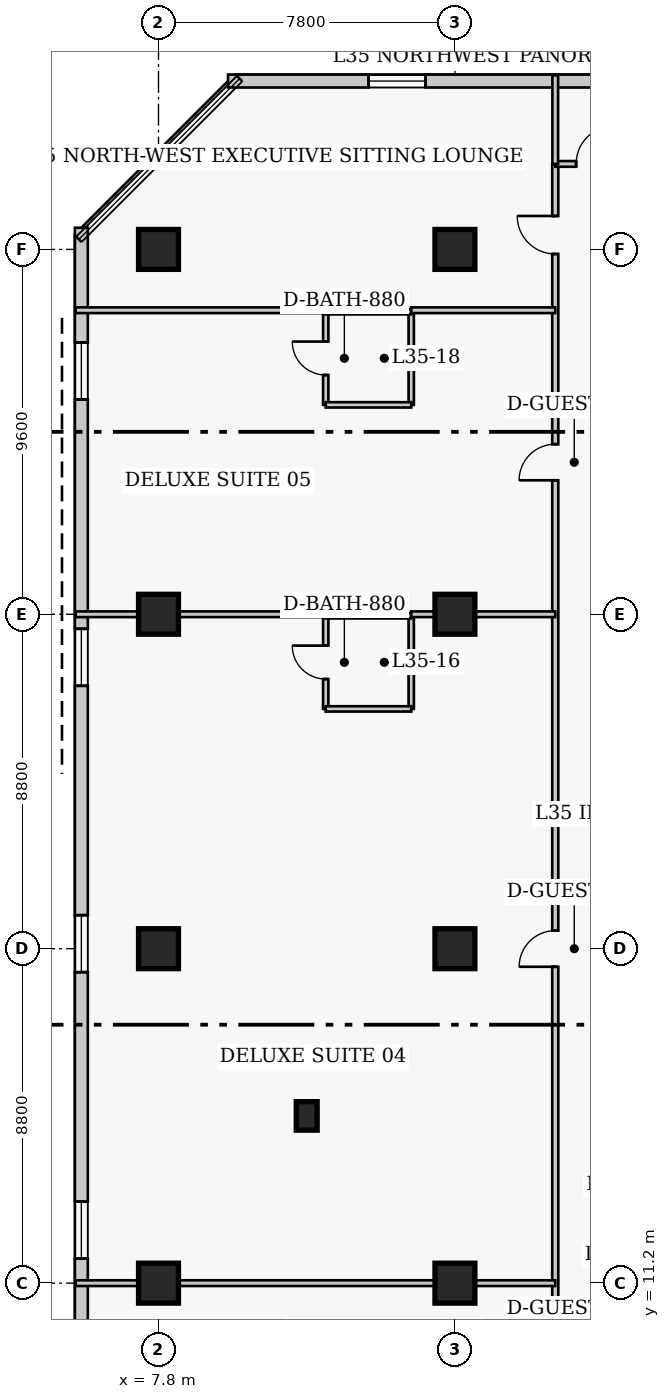
"""IFC4 building model, lengths in metres.
Left out: names, types, materials, properties, quantities, classifications, styles, units other than length and angle.
Written with IfcOpenShell. Run it as: python <this file> out.ifc"""

import sys

from ifc_helpers import new_model, si_unit, direction, frame, frame_2d, origin, origin_2d, place, context, subcontext, project, spatial, rectangle, extrude, element, fill, save


model = new_model("IFC4")
c1 = context("Model", 3, precision=1e-05, world=origin(), true_north=direction((0.0, 1.0)))
c2 = subcontext(c1, "Body", "Model", "MODEL_VIEW")
j1 = project(units=[si_unit("LENGTHUNIT", "METRE"), si_unit("PLANEANGLEUNIT", "RADIAN")], contexts=[c1])
p1 = place(None, origin())
s1 = spatial("IfcSite", under=j1, at=p1, CompositionType="ELEMENT")
p2 = place(p1, origin())
s2 = spatial("IfcBuilding", under=s1, at=p2, CompositionType="ELEMENT")
p3 = place(p2, frame((0.0, 0.0, 142.2)))
s3 = spatial("IfcBuildingStorey", under=s2, at=p3, CompositionType="ELEMENT", Elevation=142.2)
for number, where, z_axis, x_axis in (
    (1, (7.8, 11.2, 0.0), (0.0, 0.0, 1.0), (1.0, 0.0, 0.0)),
    (2, (7.8, 20.0, 0.0), (0.0, 0.0, 1.0), (1.0, 0.0, 0.0)),
    (3, (7.8, 28.8, 0.0), (0.0, 0.0, 1.0), (1.0, 0.0, 0.0)),
    (4, (7.8, 38.4, 0.0), (0.0, 0.0, 1.0), (1.0, 0.0, 0.0)),
    (5, (15.6, 11.2, 0.0), (0.0, 0.0, 1.0), (1.0, 0.0, 0.0)),
    (6, (15.6, 20.0, 0.0), (0.0, 0.0, 1.0), (1.0, 0.0, 0.0)),
    (7, (15.6, 28.8, 0.0), (0.0, 0.0, 1.0), (1.0, 0.0, 0.0)),
    (8, (15.6, 38.4, 0.0), (0.0, 0.0, 1.0), (1.0, 0.0, 0.0)),
):
    element("IfcColumn", number, at=place(p3, frame(where, z_axis=z_axis, x_axis=x_axis)), inside=s3, PredefinedType="COLUMN", context=c2, shape_type="SweptSolid", body=[
        extrude(rectangle(XDim=1.05, YDim=1.05, at=origin_2d()), origin(), (0.0, 0.0, 1.0), 3.8),
    ])
p4 = place(p3, frame((11.7, 15.6, 0.0), z_axis=(0.0, 0.0, 1.0), x_axis=(1.0, 0.0, 0.0)))
e9 = element("IfcColumn", 9, at=p4, inside=s3, PredefinedType="PILASTER", context=c2, shape_type="SweptSolid", body=[
    extrude(rectangle(XDim=0.55, YDim=0.75, at=origin_2d()), origin(), (0.0, 0.0, 1.0), 3.8),
])
p5 = place(p3, frame((36.32, 42.83, 0.0), z_axis=(0.0, 0.0, 1.0), x_axis=(-1.0, 0.0, 0.0)))
e10 = element("IfcWall", 10, at=p5, inside=s3, PredefinedType="SOLIDWALL", context=c2, shape_type="SweptSolid", body=[
    extrude(rectangle(XDim=26.69, YDim=0.34, at=frame_2d((13.345, 0.0))), origin(), (0.0, 0.0, 1.0), 3.55),
])
p6 = place(p5, frame((7.32, 0.0, 0.0)))
e11 = element("IfcOpeningElement", 11, at=p6, cuts=e10, PredefinedType="OPENING", context=c2, shape_type="SweptSolid", body=[
    extrude(rectangle(XDim=1.4, YDim=2.15, at=frame_2d((0.7, 1.075))), frame((0.0, 0.18, 0.0), z_axis=(0.0, -1.0, 0.0), x_axis=(1.0, 0.0, 0.0)), (0.0, 0.0, 1.0), 0.36),
])
p7 = place(p5, frame((2.548, 0.0, 0.85)))
e12 = element("IfcOpeningElement", 12, at=p7, cuts=e10, PredefinedType="OPENING", context=c2, shape_type="SweptSolid", body=[
    extrude(rectangle(XDim=1.5, YDim=1.75, at=frame_2d((0.75, 0.875))), frame((0.0, 0.18, 0.0), z_axis=(0.0, -1.0, 0.0), x_axis=(1.0, 0.0, 0.0)), (0.0, 0.0, 1.0), 0.36),
])
p8 = place(p5, frame((12.595, 0.0, 0.85)))
e13 = element("IfcOpeningElement", 13, at=p8, cuts=e10, PredefinedType="OPENING", context=c2, shape_type="SweptSolid", body=[
    extrude(rectangle(XDim=1.5, YDim=1.75, at=frame_2d((0.75, 0.875))), frame((0.0, 0.18, 0.0), z_axis=(0.0, -1.0, 0.0), x_axis=(1.0, 0.0, 0.0)), (0.0, 0.0, 1.0), 0.36),
])
p9 = place(p5, frame((21.492, 0.0, 0.85)))
e14 = element("IfcOpeningElement", 14, at=p9, cuts=e10, PredefinedType="OPENING", context=c2, shape_type="SweptSolid", body=[
    extrude(rectangle(XDim=1.5, YDim=1.75, at=frame_2d((0.75, 0.875))), frame((0.0, 0.18, 0.0), z_axis=(0.0, -1.0, 0.0), x_axis=(1.0, 0.0, 0.0)), (0.0, 0.0, 1.0), 0.36),
])
p10 = place(p3, frame((5.77, 38.97, 0.0), z_axis=(0.0, 0.0, 1.0), x_axis=(0.0, -1.0, 0.0)))
e15 = element("IfcWall", 15, at=p10, inside=s3, PredefinedType="SOLIDWALL", context=c2, shape_type="SweptSolid", body=[
    extrude(rectangle(XDim=30.14, YDim=0.34, at=frame_2d((15.07, 0.0))), origin(), (0.0, 0.0, 1.0), 3.55),
])
p11 = place(p10, frame((3.018, 0.0, 0.85)))
e16 = element("IfcOpeningElement", 16, at=p11, cuts=e15, PredefinedType="OPENING", context=c2, shape_type="SweptSolid", body=[
    extrude(rectangle(XDim=1.5, YDim=1.75, at=frame_2d((0.75, 0.875))), frame((0.0, 0.18, 0.0), z_axis=(0.0, -1.0, 0.0), x_axis=(1.0, 0.0, 0.0)), (0.0, 0.0, 1.0), 0.36),
])
p12 = place(p10, frame((10.552, 0.0, 0.85)))
e17 = element("IfcOpeningElement", 17, at=p12, cuts=e15, PredefinedType="OPENING", context=c2, shape_type="SweptSolid", body=[
    extrude(rectangle(XDim=1.5, YDim=1.75, at=frame_2d((0.75, 0.875))), frame((0.0, 0.18, 0.0), z_axis=(0.0, -1.0, 0.0), x_axis=(1.0, 0.0, 0.0)), (0.0, 0.0, 1.0), 0.36),
])
p13 = place(p10, frame((18.087, 0.0, 0.85)))
e18 = element("IfcOpeningElement", 18, at=p13, cuts=e15, PredefinedType="OPENING", context=c2, shape_type="SweptSolid", body=[
    extrude(rectangle(XDim=1.5, YDim=1.75, at=frame_2d((0.75, 0.875))), frame((0.0, 0.18, 0.0), z_axis=(0.0, -1.0, 0.0), x_axis=(1.0, 0.0, 0.0)), (0.0, 0.0, 1.0), 0.36),
])
p14 = place(p10, frame((25.623, 0.0, 0.85)))
e19 = element("IfcOpeningElement", 19, at=p14, cuts=e15, PredefinedType="OPENING", context=c2, shape_type="SweptSolid", body=[
    extrude(rectangle(XDim=1.5, YDim=1.75, at=frame_2d((0.75, 0.875))), frame((0.0, 0.18, 0.0), z_axis=(0.0, -1.0, 0.0), x_axis=(1.0, 0.0, 0.0)), (0.0, 0.0, 1.0), 0.36),
])
p15 = place(p3, frame((18.24, 6.85, 0.0), z_axis=(0.0, 0.0, 1.0), x_axis=(0.0, 1.0, 0.0)))
e20 = element("IfcWall", 20, at=p15, inside=s3, PredefinedType="PARTITIONING", context=c2, shape_type="SweptSolid", body=[
    extrude(rectangle(XDim=33.8, YDim=0.16, at=frame_2d((16.9, 0.0))), origin(), (0.0, 0.0, 1.0), 3.55),
])
p16 = place(p15, frame((1.7, 0.0, 0.0)))
e21 = element("IfcOpeningElement", 21, at=p16, cuts=e20, PredefinedType="OPENING", context=c2, shape_type="SweptSolid", body=[
    extrude(rectangle(XDim=0.95, YDim=2.1, at=frame_2d((0.475, 1.05))), frame((0.0, 0.09, 0.0), z_axis=(0.0, -1.0, 0.0), x_axis=(1.0, 0.0, 0.0)), (0.0, 0.0, 1.0), 0.18),
])
p17 = place(p15, frame((12.675, 0.0, 0.0)))
e22 = element("IfcOpeningElement", 22, at=p17, cuts=e20, PredefinedType="OPENING", context=c2, shape_type="SweptSolid", body=[
    extrude(rectangle(XDim=0.95, YDim=2.1, at=frame_2d((0.475, 1.05))), frame((0.0, 0.09, 0.0), z_axis=(0.0, -1.0, 0.0), x_axis=(1.0, 0.0, 0.0)), (0.0, 0.0, 1.0), 0.18),
])
p18 = place(p15, frame((25.475, 0.0, 0.0)))
e23 = element("IfcOpeningElement", 23, at=p18, cuts=e20, PredefinedType="OPENING", context=c2, shape_type="SweptSolid", body=[
    extrude(rectangle(XDim=0.95, YDim=2.1, at=frame_2d((0.475, 1.05))), frame((0.0, 0.09, 0.0), z_axis=(0.0, -1.0, 0.0), x_axis=(1.0, 0.0, 0.0)), (0.0, 0.0, 1.0), 0.18),
])
p19 = place(p15, frame((31.43, 0.0, 0.0)))
e24 = element("IfcOpeningElement", 24, at=p19, cuts=e20, PredefinedType="OPENING", context=c2, shape_type="SweptSolid", body=[
    extrude(rectangle(XDim=1.0, YDim=2.15, at=frame_2d((0.5, 1.075))), frame((0.0, 0.09, 0.0), z_axis=(0.0, -1.0, 0.0), x_axis=(1.0, 0.0, 0.0)), (0.0, 0.0, 1.0), 0.18),
])
p20 = place(p3, frame((18.24, 40.65, 0.0), z_axis=(0.0, 0.0, 1.0), x_axis=(1.0, 0.0, 0.0)))
e25 = element("IfcWall", 25, at=p20, inside=s3, PredefinedType="PARTITIONING", context=c2, shape_type="SweptSolid", body=[
    extrude(rectangle(XDim=3.86, YDim=0.15, at=frame_2d((1.93, 0.0))), origin(), (0.0, 0.0, 1.0), 3.55),
])
p21 = place(p20, frame((0.55, 0.0, 0.0)))
e26 = element("IfcOpeningElement", 26, at=p21, cuts=e25, PredefinedType="OPENING", context=c2, shape_type="SweptSolid", body=[
    extrude(rectangle(XDim=1.0, YDim=2.15, at=frame_2d((0.5, 1.075))), frame((0.0, 0.085, 0.0), z_axis=(0.0, -1.0, 0.0), x_axis=(1.0, 0.0, 0.0)), (0.0, 0.0, 1.0), 0.17),
])
p22 = place(p3, frame((18.24, 40.65, 0.0), z_axis=(0.0, 0.0, 1.0), x_axis=(0.0, 1.0, 0.0)))
e27 = element("IfcWall", 27, at=p22, inside=s3, PredefinedType="PARTITIONING", context=c2, shape_type="SweptSolid", body=[
    extrude(rectangle(XDim=2.33, YDim=0.15, at=frame_2d((1.165, 0.0))), origin(), (0.0, 0.0, 1.0), 3.55),
])
p23 = place(p3, frame((5.62, 11.2, 0.0), z_axis=(0.0, 0.0, 1.0), x_axis=(1.0, 0.0, 0.0)))
e28 = element("IfcWall", 28, at=p23, inside=s3, PredefinedType="PARTITIONING", context=c2, shape_type="SweptSolid", body=[
    extrude(rectangle(XDim=12.62, YDim=0.15, at=frame_2d((6.31, 0.0))), origin(), (0.0, 0.0, 1.0), 2.778),
])
p24 = place(p3, frame((12.2, 26.31, 0.0), z_axis=(0.0, 0.0, 1.0), x_axis=(0.0, 1.0, 0.0)))
e29 = element("IfcWall", 29, at=p24, inside=s3, PredefinedType="PLUMBINGWALL", context=c2, shape_type="SweptSolid", body=[
    extrude(rectangle(XDim=2.45, YDim=0.14, at=frame_2d((1.225, 0.0))), origin(), (0.0, 0.0, 1.0), 3.55),
])
p25 = place(p24, frame((0.785, 0.0, 0.0)))
e30 = element("IfcOpeningElement", 30, at=p25, cuts=e29, PredefinedType="OPENING", context=c2, shape_type="SweptSolid", body=[
    extrude(rectangle(XDim=0.88, YDim=2.05, at=frame_2d((0.44, 1.025))), frame((0.0, 0.08, 0.0), z_axis=(0.0, -1.0, 0.0), x_axis=(1.0, 0.0, 0.0)), (0.0, 0.0, 1.0), 0.16),
])
p26 = place(p3, frame((14.45, 26.31, 0.0), z_axis=(0.0, 0.0, 1.0), x_axis=(0.0, 1.0, 0.0)))
e31 = element("IfcWall", 31, at=p26, inside=s3, PredefinedType="PLUMBINGWALL", context=c2, shape_type="SweptSolid", body=[
    extrude(rectangle(XDim=2.45, YDim=0.14, at=frame_2d((1.225, 0.0))), origin(), (0.0, 0.0, 1.0), 3.55),
])
p27 = place(p3, frame((12.2, 26.31, 0.0), z_axis=(0.0, 0.0, 1.0), x_axis=(1.0, 0.0, 0.0)))
e32 = element("IfcWall", 32, at=p27, inside=s3, PredefinedType="PLUMBINGWALL", context=c2, shape_type="SweptSolid", body=[
    extrude(rectangle(XDim=2.25, YDim=0.14, at=frame_2d((1.125, 0.0))), origin(), (0.0, 0.0, 1.0), 3.55),
])
p28 = place(p3, frame((12.2, 28.76, 0.0), z_axis=(0.0, 0.0, 1.0), x_axis=(1.0, 0.0, 0.0)))
e33 = element("IfcWall", 33, at=p28, inside=s3, PredefinedType="PLUMBINGWALL", context=c2, shape_type="SweptSolid", body=[
    extrude(rectangle(XDim=2.25, YDim=0.14, at=frame_2d((1.125, 0.0))), origin(), (0.0, 0.0, 1.0), 2.9),
])
p29 = place(p3, frame((5.62, 28.8, 0.0), z_axis=(0.0, 0.0, 1.0), x_axis=(1.0, 0.0, 0.0)))
e34 = element("IfcWall", 34, at=p29, inside=s3, PredefinedType="PARTITIONING", context=c2, shape_type="SweptSolid", body=[
    extrude(rectangle(XDim=6.58, YDim=0.15, at=frame_2d((3.29, 0.0))), origin(), (0.0, 0.0, 1.0), 2.778),
])
p30 = place(p3, frame((14.45, 28.8, 0.0), z_axis=(0.0, 0.0, 1.0), x_axis=(1.0, 0.0, 0.0)))
e35 = element("IfcWall", 35, at=p30, inside=s3, PredefinedType="PARTITIONING", context=c2, shape_type="SweptSolid", body=[
    extrude(rectangle(XDim=3.79, YDim=0.15, at=frame_2d((1.895, 0.0))), origin(), (0.0, 0.0, 1.0), 2.778),
])
p31 = place(p3, frame((12.2, 34.31, 0.0), z_axis=(0.0, 0.0, 1.0), x_axis=(0.0, 1.0, 0.0)))
e36 = element("IfcWall", 36, at=p31, inside=s3, PredefinedType="PLUMBINGWALL", context=c2, shape_type="SweptSolid", body=[
    extrude(rectangle(XDim=2.45, YDim=0.14, at=frame_2d((1.225, 0.0))), origin(), (0.0, 0.0, 1.0), 3.55),
])
p32 = place(p31, frame((0.785, 0.0, 0.0)))
e37 = element("IfcOpeningElement", 37, at=p32, cuts=e36, PredefinedType="OPENING", context=c2, shape_type="SweptSolid", body=[
    extrude(rectangle(XDim=0.88, YDim=2.05, at=frame_2d((0.44, 1.025))), frame((0.0, 0.08, 0.0), z_axis=(0.0, -1.0, 0.0), x_axis=(1.0, 0.0, 0.0)), (0.0, 0.0, 1.0), 0.16),
])
p33 = place(p3, frame((14.45, 34.31, 0.0), z_axis=(0.0, 0.0, 1.0), x_axis=(0.0, 1.0, 0.0)))
e38 = element("IfcWall", 38, at=p33, inside=s3, PredefinedType="PLUMBINGWALL", context=c2, shape_type="SweptSolid", body=[
    extrude(rectangle(XDim=2.45, YDim=0.14, at=frame_2d((1.225, 0.0))), origin(), (0.0, 0.0, 1.0), 3.55),
])
for number, where, z_axis, x_axis in (
    (39, (12.2, 34.31, 0.0), (0.0, 0.0, 1.0), (1.0, 0.0, 0.0)),
    (40, (12.2, 36.76, 0.0), (0.0, 0.0, 1.0), (1.0, 0.0, 0.0)),
):
    element("IfcWall", number, at=place(p3, frame(where, z_axis=z_axis, x_axis=x_axis)), inside=s3, PredefinedType="PLUMBINGWALL", context=c2, shape_type="SweptSolid", body=[
        extrude(rectangle(XDim=2.25, YDim=0.14, at=frame_2d((1.125, 0.0))), origin(), (0.0, 0.0, 1.0), 3.55),
    ])
p34 = place(p3, frame((5.62, 36.8, 0.0), z_axis=(0.0, 0.0, 1.0), x_axis=(1.0, 0.0, 0.0)))
e41 = element("IfcWall", 41, at=p34, inside=s3, PredefinedType="PARTITIONING", context=c2, shape_type="SweptSolid", body=[
    extrude(rectangle(XDim=6.58, YDim=0.15, at=frame_2d((3.29, 0.0))), origin(), (0.0, 0.0, 1.0), 3.55),
])
p35 = place(p3, frame((14.45, 36.8, 0.0), z_axis=(0.0, 0.0, 1.0), x_axis=(1.0, 0.0, 0.0)))
e42 = element("IfcWall", 42, at=p35, inside=s3, PredefinedType="PARTITIONING", context=c2, shape_type="SweptSolid", body=[
    extrude(rectangle(XDim=3.79, YDim=0.15, at=frame_2d((1.895, 0.0))), origin(), (0.0, 0.0, 1.0), 3.55),
])
p36 = place(p9, origin())
e43 = element("IfcWindow", 43, at=p36, inside=s3, PartitioningType="SINGLE_PANEL", PredefinedType="WINDOW", context=c2, shape_type="SweptSolid", body=[
    extrude(rectangle(XDim=1.5, YDim=1.75, at=frame_2d((0.75, 0.875))), frame((0.0, 0.03, 0.0), z_axis=(0.0, -1.0, 0.0), x_axis=(1.0, 0.0, 0.0)), (0.0, 0.0, 1.0), 0.06),
])
fill(e14, e43)
p37 = place(p11, origin())
e44 = element("IfcWindow", 44, at=p37, inside=s3, PartitioningType="SINGLE_PANEL", PredefinedType="WINDOW", context=c2, shape_type="SweptSolid", body=[
    extrude(rectangle(XDim=1.5, YDim=1.75, at=frame_2d((0.75, 0.875))), frame((0.0, 0.03, 0.0), z_axis=(0.0, -1.0, 0.0), x_axis=(1.0, 0.0, 0.0)), (0.0, 0.0, 1.0), 0.06),
])
fill(e16, e44)
p38 = place(p12, origin())
e45 = element("IfcWindow", 45, at=p38, inside=s3, PartitioningType="SINGLE_PANEL", PredefinedType="WINDOW", context=c2, shape_type="SweptSolid", body=[
    extrude(rectangle(XDim=1.5, YDim=1.75, at=frame_2d((0.75, 0.875))), frame((0.0, 0.03, 0.0), z_axis=(0.0, -1.0, 0.0), x_axis=(1.0, 0.0, 0.0)), (0.0, 0.0, 1.0), 0.06),
])
fill(e17, e45)
p39 = place(p13, origin())
e46 = element("IfcWindow", 46, at=p39, inside=s3, PartitioningType="SINGLE_PANEL", PredefinedType="WINDOW", context=c2, shape_type="SweptSolid", body=[
    extrude(rectangle(XDim=1.5, YDim=1.75, at=frame_2d((0.75, 0.875))), frame((0.0, 0.03, 0.0), z_axis=(0.0, -1.0, 0.0), x_axis=(1.0, 0.0, 0.0)), (0.0, 0.0, 1.0), 0.06),
])
fill(e18, e46)
p40 = place(p14, origin())
e47 = element("IfcWindow", 47, at=p40, inside=s3, PartitioningType="SINGLE_PANEL", PredefinedType="WINDOW", context=c2, shape_type="SweptSolid", body=[
    extrude(rectangle(XDim=1.5, YDim=1.75, at=frame_2d((0.75, 0.875))), frame((0.0, 0.03, 0.0), z_axis=(0.0, -1.0, 0.0), x_axis=(1.0, 0.0, 0.0)), (0.0, 0.0, 1.0), 0.06),
])
fill(e19, e47)
p41 = place(p21, origin())
e48 = element("IfcDoor", 48, at=p41, inside=s3, OperationType="SINGLE_SWING_RIGHT", PredefinedType="DOOR", context=c2, shape_type="SweptSolid", body=[
    extrude(rectangle(XDim=1.0, YDim=2.15, at=frame_2d((0.5, 1.075))), frame((0.0, 0.025, 0.0), z_axis=(0.0, -1.0, 0.0), x_axis=(1.0, 0.0, 0.0)), (0.0, 0.0, 1.0), 0.05),
])
fill(e26, e48)
p42 = place(p25, origin())
e49 = element("IfcDoor", 49, at=p42, inside=s3, OperationType="SINGLE_SWING_RIGHT", PredefinedType="DOOR", context=c2, shape_type="SweptSolid", body=[
    extrude(rectangle(XDim=0.88, YDim=2.05, at=frame_2d((0.44, 1.025))), frame((0.0, 0.025, 0.0), z_axis=(0.0, -1.0, 0.0), x_axis=(1.0, 0.0, 0.0)), (0.0, 0.0, 1.0), 0.05),
])
fill(e30, e49)
p43 = place(p17, origin())
e50 = element("IfcDoor", 50, at=p43, inside=s3, OperationType="SINGLE_SWING_LEFT", PredefinedType="DOOR", context=c2, shape_type="SweptSolid", body=[
    extrude(rectangle(XDim=0.95, YDim=2.1, at=frame_2d((0.475, 1.05))), frame((0.0, 0.025, 0.0), z_axis=(0.0, -1.0, 0.0), x_axis=(1.0, 0.0, 0.0)), (0.0, 0.0, 1.0), 0.05),
])
fill(e22, e50)
p44 = place(p32, origin())
e51 = element("IfcDoor", 51, at=p44, inside=s3, OperationType="SINGLE_SWING_RIGHT", PredefinedType="DOOR", context=c2, shape_type="SweptSolid", body=[
    extrude(rectangle(XDim=0.88, YDim=2.05, at=frame_2d((0.44, 1.025))), frame((0.0, 0.025, 0.0), z_axis=(0.0, -1.0, 0.0), x_axis=(1.0, 0.0, 0.0)), (0.0, 0.0, 1.0), 0.05),
])
fill(e37, e51)
p45 = place(p18, origin())
e52 = element("IfcDoor", 52, at=p45, inside=s3, OperationType="SINGLE_SWING_LEFT", PredefinedType="DOOR", context=c2, shape_type="SweptSolid", body=[
    extrude(rectangle(XDim=0.95, YDim=2.1, at=frame_2d((0.475, 1.05))), frame((0.0, 0.025, 0.0), z_axis=(0.0, -1.0, 0.0), x_axis=(1.0, 0.0, 0.0)), (0.0, 0.0, 1.0), 0.05),
])
fill(e23, e52)
p46 = place(p19, origin())
e53 = element("IfcDoor", 53, at=p46, inside=s3, OperationType="SINGLE_SWING_RIGHT", PredefinedType="DOOR", context=c2, shape_type="SweptSolid", body=[
    extrude(rectangle(XDim=1.0, YDim=2.15, at=frame_2d((0.5, 1.075))), frame((0.0, 0.025, 0.0), z_axis=(0.0, -1.0, 0.0), x_axis=(1.0, 0.0, 0.0)), (0.0, 0.0, 1.0), 0.05),
])
fill(e24, e53)
save(model, sys.argv[1])
